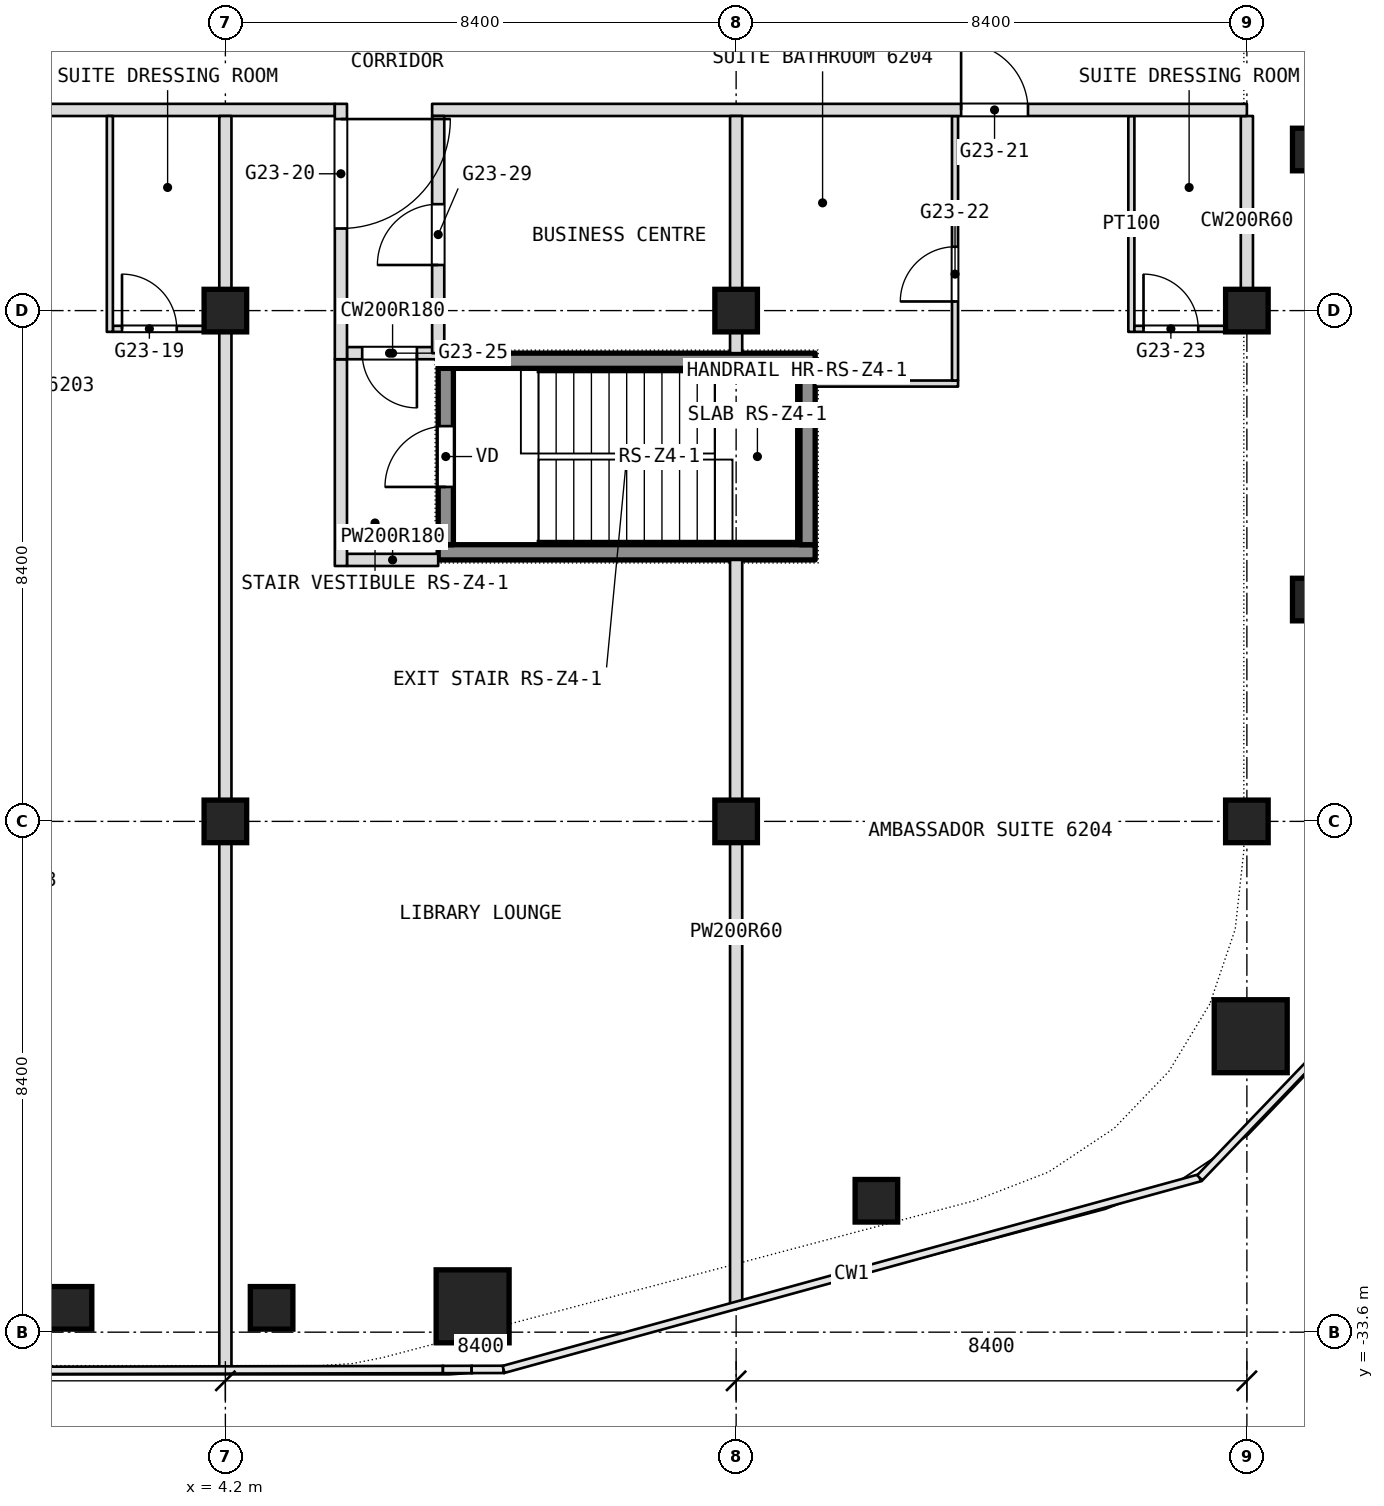
"""IFC4 building model, lengths in metres.
Left out: names, types, materials, properties, quantities, classifications, styles, units other than length and angle.
Written with IfcOpenShell. Run it as: python <this file> out.ifc"""

import sys

from ifc_helpers import new_model, si_unit, direction, frame, frame_2d, origin, origin_2d, place, context, subcontext, project, spatial, rectangle, extrude, element, fill, save


model = new_model("IFC4")
c1 = context("Model", 3, precision=1e-05, world=origin(), true_north=direction((0.0, 1.0)))
c2 = subcontext(c1, "Body", "Model", "MODEL_VIEW")
j1 = project(units=[si_unit("LENGTHUNIT", "METRE"), si_unit("PLANEANGLEUNIT", "RADIAN")], contexts=[c1])
p1 = place(None, origin())
s1 = spatial("IfcSite", under=j1, at=p1, CompositionType="ELEMENT")
p2 = place(p1, origin())
s2 = spatial("IfcBuilding", under=s1, at=p2, CompositionType="ELEMENT")
p3 = place(p2, frame((0.0, 0.0, 270.5)))
s3 = spatial("IfcBuildingStorey", under=s2, at=p3, CompositionType="ELEMENT", Elevation=270.5)
for number, where, z_axis, x_axis in (
    (1, (8.266, -33.175, 0.0), (0.0, 0.0, 1.0), (1.0, 0.0, 0.0)),
    (2, (21.063, -28.733, 0.0), (0.0, 0.0, 1.0), (1.0, 0.0, 0.0)),
):
    element("IfcColumn", number, at=place(p3, frame(where, z_axis=z_axis, x_axis=x_axis)), inside=s3, PredefinedType="COLUMN", context=c2, shape_type="SweptSolid", body=[
        extrude(rectangle(XDim=1.2, YDim=1.2, at=origin_2d()), origin(), (0.0, 0.0, 1.0), 3.6),
    ])
for number, where, z_axis, x_axis in (
    (3, (4.2, -25.2, 0.0), (0.0, 0.0, 1.0), (1.0, 0.0, 0.0)),
    (4, (4.2, -16.8, 0.0), (0.0, 0.0, 1.0), (1.0, 0.0, 0.0)),
    (5, (12.6, -25.2, 0.0), (0.0, 0.0, 1.0), (1.0, 0.0, 0.0)),
    (6, (12.6, -16.8, 0.0), (0.0, 0.0, 1.0), (1.0, 0.0, 0.0)),
    (7, (21.0, -25.2, 0.0), (0.0, 0.0, 1.0), (1.0, 0.0, 0.0)),
    (8, (21.0, -16.8, 0.0), (0.0, 0.0, 1.0), (1.0, 0.0, 0.0)),
    (9, (22.1, -14.151, 0.0), (0.0, 0.0, 1.0), (1.0, 0.0, 0.0)),
    (10, (22.1, -21.552, 0.0), (0.0, 0.0, 1.0), (1.0, 0.0, 0.0)),
    (11, (14.907, -31.439, 0.0), (0.0, 0.0, 1.0), (1.0, 0.0, 0.0)),
    (12, (4.96, -33.2, 0.0), (0.0, 0.0, 1.0), (1.0, 0.0, 0.0)),
    (13, (1.653, -33.2, 0.0), (0.0, 0.0, 1.0), (1.0, 0.0, 0.0)),
):
    element("IfcColumn", number, at=place(p3, frame(where, z_axis=z_axis, x_axis=x_axis)), inside=s3, PredefinedType="COLUMN", context=c2, shape_type="SweptSolid", body=[
        extrude(rectangle(XDim=0.7, YDim=0.7, at=origin_2d()), origin(), (0.0, 0.0, 1.0), 3.6),
    ])
p4 = place(p3, frame((21.0, -17.05, 0.0), z_axis=(0.0, 0.0, 1.0), x_axis=(0.0, 1.0, 0.0)))
e14 = element("IfcWall", 14, at=p4, inside=s3, PredefinedType="PARTITIONING", context=c2, shape_type="SweptSolid", body=[
    extrude(rectangle(XDim=3.45, YDim=0.2, at=frame_2d((1.725, 0.0))), origin(), (0.0, 0.0, 1.0), 3.34),
])
p5 = place(p3, frame((6.2, -20.9, 0.0), z_axis=(0.0, 0.0, 1.0), x_axis=(1.0, 0.0, 0.0)))
e15 = element("IfcWall", 15, at=p5, inside=s3, PredefinedType="PARTITIONING", context=c2, shape_type="SweptSolid", body=[
    extrude(rectangle(XDim=1.5, YDim=0.2, at=frame_2d((0.75, 0.0))), origin(), (0.0, 0.0, 1.0), 3.34),
])
p6 = place(p3, frame((19.1, -17.15, 0.0), z_axis=(0.0, 0.0, 1.0), x_axis=(0.0, 1.0, 0.0)))
e16 = element("IfcWall", 16, at=p6, inside=s3, PredefinedType="PARTITIONING", context=c2, shape_type="SweptSolid", body=[
    extrude(rectangle(XDim=3.55, YDim=0.1, at=frame_2d((1.775, 0.0))), origin(), (0.0, 0.0, 1.0), 3.34),
])
p7 = place(p3, frame((13.9, -18.0, 0.0), z_axis=(0.0, 0.0, 1.0), x_axis=(1.0, 0.0, 0.0)))
e17 = element("IfcWall", 17, at=p7, inside=s3, PredefinedType="PARTITIONING", context=c2, shape_type="SweptSolid", body=[
    extrude(rectangle(XDim=2.35, YDim=0.1, at=frame_2d((1.175, 0.0))), origin(), (0.0, 0.0, 1.0), 3.34),
])
p8 = place(p3, frame((6.2, -17.5, 0.0), z_axis=(0.0, 0.0, 1.0), x_axis=(1.0, 0.0, 0.0)))
e18 = element("IfcWall", 18, at=p8, inside=s3, PredefinedType="PARTITIONING", context=c2, shape_type="SweptSolid", body=[
    extrude(rectangle(XDim=1.5, YDim=0.2, at=frame_2d((0.75, 0.0))), origin(), (0.0, 0.0, 1.0), 3.34),
])
p9 = place(p8, frame((0.25, 0.0, 0.0)))
e19 = element("IfcOpeningElement", 19, at=p9, cuts=e18, PredefinedType="OPENING", context=c2, shape_type="SweptSolid", body=[
    extrude(rectangle(XDim=0.9, YDim=2.1, at=frame_2d((0.45, 1.05))), frame((0.0, 0.1, 0.0), z_axis=(0.0, -1.0, 0.0), x_axis=(1.0, 0.0, 0.0)), (0.0, 0.0, 1.0), 0.2),
])
p10 = place(p3, frame((2.35, -17.1, 0.0), z_axis=(0.0, 0.0, 1.0), x_axis=(1.0, 0.0, 0.0)))
e20 = element("IfcWall", 20, at=p10, inside=s3, PredefinedType="PARTITIONING", context=c2, shape_type="SweptSolid", body=[
    extrude(rectangle(XDim=1.95, YDim=0.1, at=frame_2d((0.975, 0.0))), origin(), (0.0, 0.0, 1.0), 3.34),
])
p11 = place(p10, frame((0.15, 0.0, 0.0)))
e21 = element("IfcOpeningElement", 21, at=p11, cuts=e20, PredefinedType="OPENING", context=c2, shape_type="SweptSolid", body=[
    extrude(rectangle(XDim=0.9, YDim=2.1, at=frame_2d((0.45, 1.05))), frame((0.0, 0.05, 0.0), z_axis=(0.0, -1.0, 0.0), x_axis=(1.0, 0.0, 0.0)), (0.0, 0.0, 1.0), 0.1),
])
p12 = place(p3, frame((19.15, -17.1, 0.0), z_axis=(0.0, 0.0, 1.0), x_axis=(1.0, 0.0, 0.0)))
e22 = element("IfcWall", 22, at=p12, inside=s3, PredefinedType="PARTITIONING", context=c2, shape_type="SweptSolid", body=[
    extrude(rectangle(XDim=1.85, YDim=0.1, at=frame_2d((0.925, 0.0))), origin(), (0.0, 0.0, 1.0), 3.34),
])
p13 = place(p12, frame((0.15, 0.0, 0.0)))
e23 = element("IfcOpeningElement", 23, at=p13, cuts=e22, PredefinedType="OPENING", context=c2, shape_type="SweptSolid", body=[
    extrude(rectangle(XDim=0.9, YDim=2.1, at=frame_2d((0.45, 1.05))), frame((0.0, 0.05, 0.0), z_axis=(0.0, -1.0, 0.0), x_axis=(1.0, 0.0, 0.0)), (0.0, 0.0, 1.0), 0.1),
])
p14 = place(p3, frame((16.2, -17.95, 0.0), z_axis=(0.0, 0.0, 1.0), x_axis=(0.0, 1.0, 0.0)))
e24 = element("IfcWall", 24, at=p14, inside=s3, PredefinedType="PARTITIONING", context=c2, shape_type="SweptSolid", body=[
    extrude(rectangle(XDim=4.35, YDim=0.1, at=frame_2d((2.175, 0.0))), origin(), (0.0, 0.0, 1.0), 3.34),
])
p15 = place(p14, frame((1.3, 0.0, 0.0)))
e25 = element("IfcOpeningElement", 25, at=p15, cuts=e24, PredefinedType="OPENING", context=c2, shape_type="SweptSolid", body=[
    extrude(rectangle(XDim=0.9, YDim=2.1, at=frame_2d((0.45, 1.05))), frame((0.0, 0.05, 0.0), z_axis=(0.0, -1.0, 0.0), x_axis=(1.0, 0.0, 0.0)), (0.0, 0.0, 1.0), 0.1),
])
p16 = place(p3, frame((-10.0, -13.5, 0.0), z_axis=(0.0, 0.0, 1.0), x_axis=(1.0, 0.0, 0.0)))
e26 = element("IfcWall", 26, at=p16, inside=s3, PredefinedType="PARTITIONING", context=c2, shape_type="SweptSolid", body=[
    extrude(rectangle(XDim=16.0, YDim=0.2, at=frame_2d((8.0, 0.0))), origin(), (0.0, 0.0, 1.0), 3.34),
])
p17 = place(p16, frame((0.25, 0.0, 0.0)))
e27 = element("IfcOpeningElement", 27, at=p17, cuts=e26, PredefinedType="OPENING", context=c2, shape_type="SweptSolid", body=[
    extrude(rectangle(XDim=1.1, YDim=2.1, at=frame_2d((0.55, 1.05))), frame((0.0, 0.1, 0.0), z_axis=(0.0, -1.0, 0.0), x_axis=(1.0, 0.0, 0.0)), (0.0, 0.0, 1.0), 0.2),
])
p18 = place(p16, frame((9.5, 0.0, 0.0)))
e28 = element("IfcOpeningElement", 28, at=p18, cuts=e26, PredefinedType="OPENING", context=c2, shape_type="SweptSolid", body=[
    extrude(rectangle(XDim=1.1, YDim=2.1, at=frame_2d((0.55, 1.05))), frame((0.0, 0.1, 0.0), z_axis=(0.0, -1.0, 0.0), x_axis=(1.0, 0.0, 0.0)), (0.0, 0.0, 1.0), 0.2),
])
p19 = place(p3, frame((7.6, -13.5, 0.0), z_axis=(0.0, 0.0, 1.0), x_axis=(1.0, 0.0, 0.0)))
e29 = element("IfcWall", 29, at=p19, inside=s3, PredefinedType="PARTITIONING", context=c2, shape_type="SweptSolid", body=[
    extrude(rectangle(XDim=13.4, YDim=0.2, at=frame_2d((6.7, 0.0))), origin(), (0.0, 0.0, 1.0), 3.34),
])
p20 = place(p19, frame((8.7, 0.0, 0.0)))
e30 = element("IfcOpeningElement", 30, at=p20, cuts=e29, PredefinedType="OPENING", context=c2, shape_type="SweptSolid", body=[
    extrude(rectangle(XDim=1.1, YDim=2.1, at=frame_2d((0.55, 1.05))), frame((0.0, 0.1, 0.0), z_axis=(0.0, -1.0, 0.0), x_axis=(1.0, 0.0, 0.0)), (0.0, 0.0, 1.0), 0.2),
])
p21 = place(p3, frame((12.6, -33.13, 0.0), z_axis=(0.0, 0.0, 1.0), x_axis=(0.0, 1.0, 0.0)))
e31 = element("IfcWall", 31, at=p21, inside=s3, PredefinedType="PARTITIONING", context=c2, shape_type="SweptSolid", body=[
    extrude(rectangle(XDim=12.23, YDim=0.2, at=frame_2d((6.115, 0.0))), origin(), (0.0, 0.0, 1.0), 3.34),
])
p22 = place(p3, frame((12.6, -17.5, 0.0), z_axis=(0.0, 0.0, 1.0), x_axis=(0.0, 1.0, 0.0)))
e32 = element("IfcWall", 32, at=p22, inside=s3, PredefinedType="PARTITIONING", context=c2, shape_type="SweptSolid", body=[
    extrude(rectangle(XDim=3.9, YDim=0.2, at=frame_2d((1.95, 0.0))), origin(), (0.0, 0.0, 1.0), 3.34),
])
p23 = place(p3, frame((7.7, -17.5, 0.0), z_axis=(0.0, 0.0, 1.0), x_axis=(0.0, 1.0, 0.0)))
e33 = element("IfcWall", 33, at=p23, inside=s3, PredefinedType="PARTITIONING", context=c2, shape_type="SweptSolid", body=[
    extrude(rectangle(XDim=3.9, YDim=0.2, at=frame_2d((1.95, 0.0))), origin(), (0.0, 0.0, 1.0), 3.34),
])
p24 = place(p23, frame((1.45, 0.0, 0.0)))
e34 = element("IfcOpeningElement", 34, at=p24, cuts=e33, PredefinedType="OPENING", context=c2, shape_type="SweptSolid", body=[
    extrude(rectangle(XDim=1.0, YDim=2.1, at=frame_2d((0.5, 1.05))), frame((0.0, 0.1, 0.0), z_axis=(0.0, -1.0, 0.0), x_axis=(1.0, 0.0, 0.0)), (0.0, 0.0, 1.0), 0.2),
])
p25 = place(p3, frame((6.1, -21.0, 0.0), z_axis=(0.0, 0.0, 1.0), x_axis=(0.0, 1.0, 0.0)))
e35 = element("IfcWall", 35, at=p25, inside=s3, PredefinedType="PARTITIONING", context=c2, shape_type="SweptSolid", body=[
    extrude(rectangle(XDim=3.4, YDim=0.2, at=frame_2d((1.7, 0.0))), origin(), (0.0, 0.0, 1.0), 3.34),
])
p26 = place(p3, frame((6.1, -17.6, 0.0), z_axis=(0.0, 0.0, 1.0), x_axis=(0.0, 1.0, 0.0)))
e36 = element("IfcWall", 36, at=p26, inside=s3, PredefinedType="PARTITIONING", context=c2, shape_type="SweptSolid", body=[
    extrude(rectangle(XDim=4.2, YDim=0.2, at=frame_2d((2.1, 0.0))), origin(), (0.0, 0.0, 1.0), 3.34),
])
p27 = place(p26, frame((2.15, 0.0, 0.0)))
e37 = element("IfcOpeningElement", 37, at=p27, cuts=e36, PredefinedType="OPENING", context=c2, shape_type="SweptSolid", body=[
    extrude(rectangle(XDim=1.8, YDim=2.1, at=frame_2d((0.9, 1.05))), frame((0.0, 0.1, 0.0), z_axis=(0.0, -1.0, 0.0), x_axis=(1.0, 0.0, 0.0)), (0.0, 0.0, 1.0), 0.2),
])
p28 = place(p3, frame((4.2, -34.2, 0.0), z_axis=(0.0, 0.0, 1.0), x_axis=(0.0, 1.0, 0.0)))
e38 = element("IfcWall", 38, at=p28, inside=s3, PredefinedType="PARTITIONING", context=c2, shape_type="SweptSolid", body=[
    extrude(rectangle(XDim=20.6, YDim=0.2, at=frame_2d((10.3, 0.0))), origin(), (0.0, 0.0, 1.0), 3.34),
])
p29 = place(p3, frame((2.3, -17.15, 0.0), z_axis=(0.0, 0.0, 1.0), x_axis=(0.0, 1.0, 0.0)))
e39 = element("IfcWall", 39, at=p29, inside=s3, PredefinedType="PARTITIONING", context=c2, shape_type="SweptSolid", body=[
    extrude(rectangle(XDim=3.55, YDim=0.1, at=frame_2d((1.775, 0.0))), origin(), (0.0, 0.0, 1.0), 3.34),
])
for number, where, z_axis, x_axis in (
    (40, (7.7, -20.775, 0.1), (0.0, 0.0, 1.0), (1.0, 0.0, 0.0)),
    (41, (7.7, -17.625, 0.1), (0.0, 0.0, 1.0), (1.0, 0.0, 0.0)),
):
    element("IfcWall", number, at=place(p3, frame(where, z_axis=z_axis, x_axis=x_axis)), inside=s3, PredefinedType="SHEAR", context=c2, shape_type="SweptSolid", body=[
        extrude(rectangle(XDim=6.2, YDim=0.25, at=frame_2d((3.1, 0.0))), origin(), (0.0, 0.0, 1.0), 3.6),
    ])
p30 = place(p3, frame((7.825, -20.65, 0.1), z_axis=(0.0, 0.0, 1.0), x_axis=(0.0, 1.0, 0.0)))
e42 = element("IfcWall", 42, at=p30, inside=s3, PredefinedType="SHEAR", context=c2, shape_type="SweptSolid", body=[
    extrude(rectangle(XDim=2.9, YDim=0.25, at=frame_2d((1.45, 0.0))), origin(), (0.0, 0.0, 1.0), 3.6),
])
p31 = place(p30, frame((0.95, 0.0, 0.0)))
e43 = element("IfcOpeningElement", 43, at=p31, cuts=e42, PredefinedType="OPENING", context=c2, shape_type="SweptSolid", body=[
    extrude(rectangle(XDim=1.0, YDim=2.1, at=frame_2d((0.5, 1.05))), frame((0.0, 0.125, 0.0), z_axis=(0.0, -1.0, 0.0), x_axis=(1.0, 0.0, 0.0)), (0.0, 0.0, 1.0), 0.25),
])
p32 = place(p3, frame((13.775, -20.65, 0.1), z_axis=(0.0, 0.0, 1.0), x_axis=(0.0, 1.0, 0.0)))
e44 = element("IfcWall", 44, at=p32, inside=s3, PredefinedType="SHEAR", context=c2, shape_type="SweptSolid", body=[
    extrude(rectangle(XDim=2.9, YDim=0.25, at=frame_2d((1.45, 0.0))), origin(), (0.0, 0.0, 1.0), 3.6),
])
p33 = place(p9, origin())
e45 = element("IfcDoor", 45, at=p33, inside=s3, OperationType="SINGLE_SWING_LEFT", PredefinedType="DOOR", context=c2, shape_type="SweptSolid", body=[
    extrude(rectangle(XDim=0.9, YDim=2.1, at=frame_2d((0.45, 1.05))), frame((0.0, 0.025, 0.0), z_axis=(0.0, -1.0, 0.0), x_axis=(1.0, 0.0, 0.0)), (0.0, 0.0, 1.0), 0.05),
])
fill(e19, e45)
p34 = place(p11, origin())
e46 = element("IfcDoor", 46, at=p34, inside=s3, OperationType="SINGLE_SWING_LEFT", PredefinedType="DOOR", context=c2, shape_type="SweptSolid", body=[
    extrude(rectangle(XDim=0.9, YDim=2.1, at=frame_2d((0.45, 1.05))), frame((0.0, 0.025, 0.0), z_axis=(0.0, -1.0, 0.0), x_axis=(1.0, 0.0, 0.0)), (0.0, 0.0, 1.0), 0.05),
])
fill(e21, e46)
p35 = place(p13, origin())
e47 = element("IfcDoor", 47, at=p35, inside=s3, OperationType="SINGLE_SWING_LEFT", PredefinedType="DOOR", context=c2, shape_type="SweptSolid", body=[
    extrude(rectangle(XDim=0.9, YDim=2.1, at=frame_2d((0.45, 1.05))), frame((0.0, 0.025, 0.0), z_axis=(0.0, -1.0, 0.0), x_axis=(1.0, 0.0, 0.0)), (0.0, 0.0, 1.0), 0.05),
])
fill(e23, e47)
p36 = place(p15, origin())
e48 = element("IfcDoor", 48, at=p36, inside=s3, OperationType="SINGLE_SWING_LEFT", PredefinedType="DOOR", context=c2, shape_type="SweptSolid", body=[
    extrude(rectangle(XDim=0.9, YDim=2.1, at=frame_2d((0.45, 1.05))), frame((0.0, 0.025, 0.0), z_axis=(0.0, -1.0, 0.0), x_axis=(1.0, 0.0, 0.0)), (0.0, 0.0, 1.0), 0.05),
])
fill(e25, e48)
p37 = place(p20, origin())
e49 = element("IfcDoor", 49, at=p37, inside=s3, OperationType="SINGLE_SWING_RIGHT", PredefinedType="DOOR", context=c2, shape_type="SweptSolid", body=[
    extrude(rectangle(XDim=1.1, YDim=2.1, at=frame_2d((0.55, 1.05))), frame((0.0, 0.025, 0.0), z_axis=(0.0, -1.0, 0.0), x_axis=(1.0, 0.0, 0.0)), (0.0, 0.0, 1.0), 0.05),
])
fill(e30, e49)
p38 = place(p24, origin())
e50 = element("IfcDoor", 50, at=p38, inside=s3, OperationType="SINGLE_SWING_LEFT", PredefinedType="DOOR", context=c2, shape_type="SweptSolid", body=[
    extrude(rectangle(XDim=1.0, YDim=2.1, at=frame_2d((0.5, 1.05))), frame((0.0, 0.025, 0.0), z_axis=(0.0, -1.0, 0.0), x_axis=(1.0, 0.0, 0.0)), (0.0, 0.0, 1.0), 0.05),
])
fill(e34, e50)
p39 = place(p27, origin())
e51 = element("IfcDoor", 51, at=p39, inside=s3, OperationType="DOUBLE_DOOR_SINGLE_SWING", PredefinedType="DOOR", context=c2, shape_type="SweptSolid", body=[
    extrude(rectangle(XDim=1.8, YDim=2.1, at=frame_2d((0.9, 1.05))), frame((0.0, 0.025, 0.0), z_axis=(0.0, -1.0, 0.0), x_axis=(1.0, 0.0, 0.0)), (0.0, 0.0, 1.0), 0.05),
])
fill(e37, e51)
p40 = place(p31, origin())
e52 = element("IfcDoor", 52, at=p40, inside=s3, OperationType="SINGLE_SWING_LEFT", PredefinedType="DOOR", context=c2, shape_type="SweptSolid", body=[
    extrude(rectangle(XDim=1.0, YDim=2.1, at=frame_2d((0.5, 1.05))), frame((0.0, 0.025, 0.0), z_axis=(0.0, -1.0, 0.0), x_axis=(1.0, 0.0, 0.0)), (0.0, 0.0, 1.0), 0.05),
])
fill(e43, e52)
save(model, sys.argv[1])
